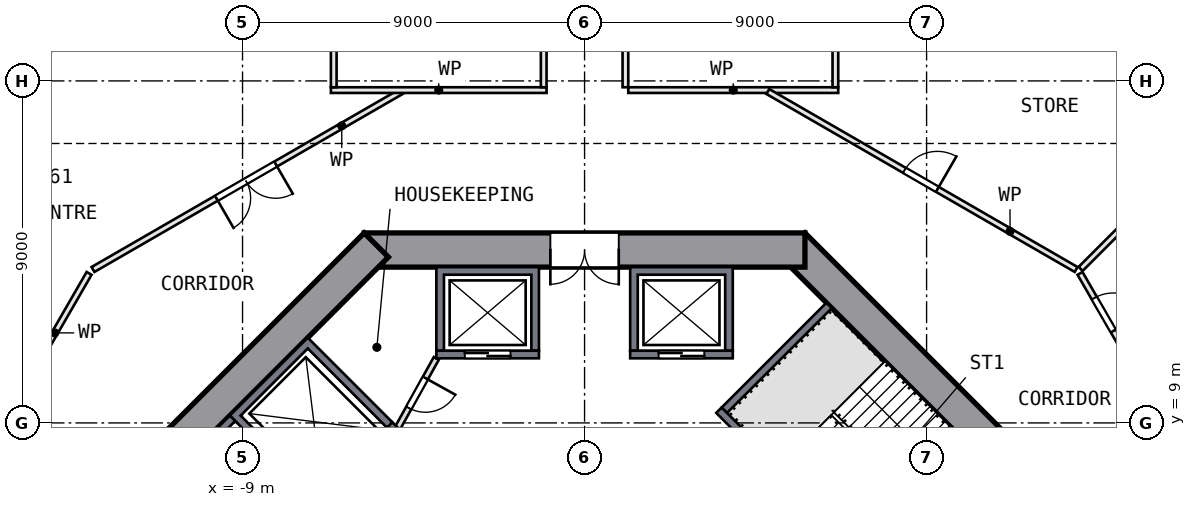
"""IFC4 building model, lengths in metres.
Left out: names, types, materials, properties, quantities, classifications, styles, units other than length and angle.
Written with IfcOpenShell. Run it as: python <this file> out.ifc"""

import sys

from ifc_helpers import new_model, si_unit, direction, frame, frame_2d, origin, place, context, subcontext, project, spatial, polyline, rectangle, outline, extrude, element, fill, save


model = new_model("IFC4")
c1 = context("Model", 3, precision=1e-05, world=origin(), true_north=direction((0.0, 1.0)))
c2 = subcontext(c1, "Body", "Model", "MODEL_VIEW")
j1 = project(units=[si_unit("LENGTHUNIT", "METRE"), si_unit("PLANEANGLEUNIT", "RADIAN")], contexts=[c1])
p1 = place(None, origin())
s1 = spatial("IfcSite", under=j1, at=p1, CompositionType="ELEMENT")
p2 = place(p1, origin())
s2 = spatial("IfcBuilding", under=s1, at=p2, CompositionType="ELEMENT")
p3 = place(p2, frame((0.0, 0.0, 14.0)))
s3 = spatial("IfcBuildingStorey", under=s2, at=p3, CompositionType="ELEMENT", Elevation=14.0)
p4 = place(p3, frame((13.682, 5.481, 0.0), z_axis=(0.0, 0.0, 1.0), x_axis=(-0.707106781, 0.707106781, 0.0)))
e1 = element("IfcWall", 1, at=p4, inside=s3, PredefinedType="SHEAR", context=c2, shape_type="SweptSolid", body=[
    extrude(rectangle(XDim=11.598, YDim=0.9, at=frame_2d((5.799, 0.0))), origin(), (0.0, 0.0, 1.0), 5.0),
])
p5 = place(p4, frame((2.099, 0.0, 0.0)))
e2 = element("IfcOpeningElement", 2, at=p5, cuts=e1, PredefinedType="OPENING", context=c2, shape_type="SweptSolid", body=[
    extrude(rectangle(XDim=1.2, YDim=2.1, at=frame_2d((0.6, 1.05))), frame((0.0, 0.46, 0.0), z_axis=(0.0, -1.0, 0.0), x_axis=(1.0, 0.0, 0.0)), (0.0, 0.0, 1.0), 0.92),
])
p6 = place(p3, frame((5.799, 13.55, 0.0), z_axis=(0.0, 0.0, 1.0), x_axis=(-1.0, 0.0, 0.0)))
e3 = element("IfcWall", 3, at=p6, inside=s3, PredefinedType="SHEAR", context=c2, shape_type="SweptSolid", body=[
    extrude(rectangle(XDim=11.598, YDim=0.9, at=frame_2d((5.799, 0.0))), origin(), (0.0, 0.0, 1.0), 5.0),
])
p7 = place(p6, frame((4.899, 0.0, 0.0)))
e4 = element("IfcOpeningElement", 4, at=p7, cuts=e3, PredefinedType="OPENING", context=c2, shape_type="SweptSolid", body=[
    extrude(rectangle(XDim=1.8, YDim=2.1, at=frame_2d((0.9, 1.05))), frame((0.0, 0.46, 0.0), z_axis=(0.0, -1.0, 0.0), x_axis=(1.0, 0.0, 0.0)), (0.0, 0.0, 1.0), 0.92),
])
p8 = place(p3, frame((-5.481, 13.682, 0.0), z_axis=(0.0, 0.0, 1.0), x_axis=(-0.707106781, -0.707106781, 0.0)))
e5 = element("IfcWall", 5, at=p8, inside=s3, PredefinedType="SHEAR", context=c2, shape_type="SweptSolid", body=[
    extrude(rectangle(XDim=11.598, YDim=0.9, at=frame_2d((5.799, 0.0))), origin(), (0.0, 0.0, 1.0), 5.0),
])
p9 = place(p3, frame((17.586, 17.777, 0.0), z_axis=(0.0, 0.0, 1.0), x_axis=(-0.866023287, 0.500003667, 0.0)))
e6 = element("IfcWall", 6, at=p9, inside=s3, PredefinedType="SOLIDWALL", context=c2, shape_type="SweptSolid", body=[
    extrude(rectangle(XDim=12.801, YDim=0.14, at=frame_2d((6.4, 0.0))), origin(), (0.0, 0.0, 1.0), 4.55),
])
p10 = place(p3, frame((-6.36, 24.258, 0.0), z_axis=(0.0, 0.0, 1.0), x_axis=(-0.866029009, -0.499993756, 0.0)))
e7 = element("IfcWall", 7, at=p10, inside=s3, PredefinedType="SOLIDWALL", context=c2, shape_type="SweptSolid", body=[
    extrude(rectangle(XDim=13.242, YDim=0.14, at=frame_2d((6.621, 0.0))), origin(), (0.0, 0.0, 1.0), 4.55),
])
p11 = place(p10, frame((1.46, 0.0, 0.9)))
e8 = element("IfcOpeningElement", 8, at=p11, cuts=e7, PredefinedType="OPENING", context=c2, shape_type="SweptSolid", body=[
    extrude(rectangle(XDim=3.6, YDim=2.7, at=frame_2d((1.8, 1.35))), frame((0.0, 0.08, 0.0), z_axis=(0.0, -1.0, 0.0), x_axis=(1.0, 0.0, 0.0)), (0.0, 0.0, 1.0), 0.16),
])
p12 = place(p10, frame((8.215, 0.0, 0.9)))
e9 = element("IfcOpeningElement", 9, at=p12, cuts=e7, PredefinedType="OPENING", context=c2, shape_type="SweptSolid", body=[
    extrude(rectangle(XDim=3.0, YDim=2.7, at=frame_2d((1.5, 1.35))), frame((0.0, 0.08, 0.0), z_axis=(0.0, -1.0, 0.0), x_axis=(1.0, 0.0, 0.0)), (0.0, 0.0, 1.0), 0.16),
])
p13 = place(p3, origin())
e10 = element("IfcWall", 10, at=p13, inside=s3, PredefinedType="SOLIDWALL", context=c2, shape_type="SweptSolid", body=[
    extrude(outline(polyline([(3.9, 13.1), (3.9, 10.9), (3.7, 10.9), (3.7, 12.9), (1.4, 12.9), (1.4, 10.9), (1.2, 10.9), (1.2, 13.1), (3.9, 13.1)])), origin(), (0.0, 0.0, 1.0), 4.55),
])
p14 = place(p3, frame((1.2, 10.8, 0.0), z_axis=(0.0, 0.0, 1.0), x_axis=(1.0, 0.0, 0.0)))
e11 = element("IfcWall", 11, at=p14, inside=s3, PredefinedType="SOLIDWALL", context=c2, shape_type="SweptSolid", body=[
    extrude(rectangle(XDim=2.7, YDim=0.2, at=frame_2d((1.35, 0.0))), origin(), (0.0, 0.0, 1.0), 4.55),
])
p15 = place(p14, frame((0.75, 0.0, 0.0)))
e12 = element("IfcOpeningElement", 12, at=p15, cuts=e11, PredefinedType="OPENING", context=c2, shape_type="SweptSolid", body=[
    extrude(rectangle(XDim=1.2, YDim=2.1, at=frame_2d((0.6, 1.05))), frame((0.0, 0.11, 0.0), z_axis=(0.0, -1.0, 0.0), x_axis=(1.0, 0.0, 0.0)), (0.0, 0.0, 1.0), 0.22),
])
p16 = place(p3, origin())
e13 = element("IfcWall", 13, at=p16, inside=s3, PredefinedType="SOLIDWALL", context=c2, shape_type="SweptSolid", body=[
    extrude(outline(polyline([(-3.9, 10.9), (-3.9, 13.1), (-1.2, 13.1), (-1.2, 10.9), (-1.4, 10.9), (-1.4, 12.9), (-3.7, 12.9), (-3.7, 10.9), (-3.9, 10.9)])), origin(), (0.0, 0.0, 1.0), 4.55),
])
p17 = place(p3, frame((-1.2, 10.8, 0.0), z_axis=(0.0, 0.0, 1.0), x_axis=(-1.0, 0.0, 0.0)))
e14 = element("IfcWall", 14, at=p17, inside=s3, PredefinedType="SOLIDWALL", context=c2, shape_type="SweptSolid", body=[
    extrude(rectangle(XDim=2.7, YDim=0.2, at=frame_2d((1.35, 0.0))), origin(), (0.0, 0.0, 1.0), 4.55),
])
p18 = place(p17, frame((0.75, 0.0, 0.0)))
e15 = element("IfcOpeningElement", 15, at=p18, cuts=e14, PredefinedType="OPENING", context=c2, shape_type="SweptSolid", body=[
    extrude(rectangle(XDim=1.2, YDim=2.1, at=frame_2d((0.6, 1.05))), frame((0.0, 0.11, 0.0), z_axis=(0.0, -1.0, 0.0), x_axis=(1.0, 0.0, 0.0)), (0.0, 0.0, 1.0), 0.22),
])
p19 = place(p3, origin())
e16 = element("IfcWall", 16, at=p19, inside=s3, PredefinedType="SOLIDWALL", context=c2, shape_type="SweptSolid", body=[
    extrude(outline(polyline([(-9.334, 9.192), (-7.283, 11.243), (-5.056, 9.016), (-5.197, 8.874), (-7.283, 10.96), (-9.051, 9.192), (-6.965, 7.106), (-7.106, 6.965), (-9.334, 9.192)])), origin(), (0.0, 0.0, 1.0), 4.55),
])
p20 = place(p3, frame((-4.985, 8.945, 0.0), z_axis=(0.0, 0.0, 1.0), x_axis=(-0.707106781, -0.707106781, 0.0)))
e17 = element("IfcWall", 17, at=p20, inside=s3, PredefinedType="SOLIDWALL", context=c2, shape_type="SweptSolid", body=[
    extrude(rectangle(XDim=2.9, YDim=0.2, at=frame_2d((1.45, 0.0))), origin(), (0.0, 0.0, 1.0), 4.55),
])
p21 = place(p20, frame((0.85, 0.0, 0.0)))
e18 = element("IfcOpeningElement", 18, at=p21, cuts=e17, PredefinedType="OPENING", context=c2, shape_type="SweptSolid", body=[
    extrude(rectangle(XDim=1.2, YDim=2.1, at=frame_2d((0.6, 1.05))), frame((0.0, 0.11, 0.0), z_axis=(0.0, -1.0, 0.0), x_axis=(1.0, 0.0, 0.0)), (0.0, 0.0, 1.0), 0.22),
])
p22 = place(p3, origin())
e19 = element("IfcWall", 19, at=p22, inside=s3, PredefinedType="SOLIDWALL", context=c2, shape_type="SweptSolid", body=[
    extrude(outline(polyline([(-11.243, 7.283), (-9.334, 9.192), (-9.192, 9.051), (-10.96, 7.283), (-8.874, 5.197), (-9.016, 5.056), (-11.243, 7.283)])), origin(), (0.0, 0.0, 1.0), 4.55),
])
p23 = place(p3, frame((3.535, 9.334, 0.0), z_axis=(0.0, 0.0, 1.0), x_axis=(0.707106781, -0.707106781, 0.0)))
e20 = element("IfcWall", 20, at=p23, inside=s3, PredefinedType="SOLIDWALL", context=c2, shape_type="SweptSolid", body=[
    extrude(rectangle(XDim=8.2, YDim=0.2, at=frame_2d((4.1, 0.0))), origin(), (0.0, 0.0, 1.0), 4.55),
])
p24 = place(p23, frame((6.6, 0.0, 0.0)))
e21 = element("IfcOpeningElement", 21, at=p24, cuts=e20, PredefinedType="OPENING", context=c2, shape_type="SweptSolid", body=[
    extrude(rectangle(XDim=1.2, YDim=2.1, at=frame_2d((0.6, 1.05))), frame((0.0, 0.11, 0.0), z_axis=(0.0, -1.0, 0.0), x_axis=(1.0, 0.0, 0.0)), (0.0, 0.0, 1.0), 0.22),
])
p25 = place(p3, frame((3.677, 9.334, 0.0), z_axis=(0.0, 0.0, 1.0), x_axis=(0.707106781, 0.707106781, 0.0)))
e22 = element("IfcWall", 22, at=p25, inside=s3, PredefinedType="SOLIDWALL", context=c2, shape_type="SweptSolid", body=[
    extrude(rectangle(XDim=3.9, YDim=0.2, at=frame_2d((1.95, 0.0))), origin(), (0.0, 0.0, 1.0), 4.55),
])
p26 = place(p3, frame((-3.9, 10.7, 0.0), z_axis=(0.0, 0.0, 1.0), x_axis=(-0.485692555, -0.874129705, 0.0)))
e23 = element("IfcWall", 23, at=p26, inside=s3, PredefinedType="PARTITIONING", context=c2, shape_type="SweptSolid", body=[
    extrude(rectangle(XDim=2.089, YDim=0.15, at=frame_2d((1.044, 0.0))), origin(), (0.0, 0.0, 1.0), 4.55),
])
p27 = place(p26, frame((0.594, 0.0, 0.0)))
e24 = element("IfcOpeningElement", 24, at=p27, cuts=e23, PredefinedType="OPENING", context=c2, shape_type="SweptSolid", body=[
    extrude(rectangle(XDim=0.9, YDim=2.1, at=frame_2d((0.45, 1.05))), frame((0.0, 0.085, 0.0), z_axis=(0.0, -1.0, 0.0), x_axis=(1.0, 0.0, 0.0)), (0.0, 0.0, 1.0), 0.17),
])
p28 = place(p3, frame((-13.038, 12.935, 0.0), z_axis=(0.0, 0.0, 1.0), x_axis=(-0.499979668, -0.866037142, 0.0)))
e25 = element("IfcWall", 25, at=p28, inside=s3, PredefinedType="PARTITIONING", context=c2, shape_type="SweptSolid", body=[
    extrude(rectangle(XDim=9.367, YDim=0.15, at=frame_2d((4.683, 0.0))), origin(), (0.0, 0.0, 1.0), 4.55),
])
p29 = place(p28, frame((3.817, 0.0, 0.0)))
e26 = element("IfcOpeningElement", 26, at=p29, cuts=e25, PredefinedType="OPENING", context=c2, shape_type="SweptSolid", body=[
    extrude(rectangle(XDim=1.8, YDim=2.1, at=frame_2d((0.9, 1.05))), frame((0.0, 0.085, 0.0), z_axis=(0.0, -1.0, 0.0), x_axis=(1.0, 0.0, 0.0)), (0.0, 0.0, 1.0), 0.17),
])
p30 = place(p3, frame((-4.823, 17.721, 0.0), z_axis=(0.0, 0.0, 1.0), x_axis=(-0.866037142, -0.499979668, 0.0)))
e27 = element("IfcWall", 27, at=p30, inside=s3, PredefinedType="PARTITIONING", context=c2, shape_type="SweptSolid", body=[
    extrude(rectangle(XDim=9.367, YDim=0.15, at=frame_2d((4.683, 0.0))), origin(), (0.0, 0.0, 1.0), 4.55),
])
p31 = place(p30, frame((3.817, 0.0, 0.0)))
e28 = element("IfcOpeningElement", 28, at=p31, cuts=e27, PredefinedType="OPENING", context=c2, shape_type="SweptSolid", body=[
    extrude(rectangle(XDim=1.8, YDim=2.1, at=frame_2d((0.9, 1.05))), frame((0.0, 0.085, 0.0), z_axis=(0.0, -1.0, 0.0), x_axis=(1.0, 0.0, 0.0)), (0.0, 0.0, 1.0), 0.17),
])
p32 = place(p3, frame((-6.675, 17.758, 0.0), z_axis=(0.0, 0.0, 1.0), x_axis=(1.0, 0.0, 0.0)))
e29 = element("IfcWall", 29, at=p32, inside=s3, PredefinedType="PARTITIONING", context=c2, shape_type="SweptSolid", body=[
    extrude(rectangle(XDim=5.675, YDim=0.15, at=frame_2d((2.838, 0.0))), origin(), (0.0, 0.0, 1.0), 4.55),
])
p33 = place(p3, frame((-6.6, 23.415, 0.0), z_axis=(0.0, 0.0, 1.0), x_axis=(0.0, -1.0, 0.0)))
e30 = element("IfcWall", 30, at=p33, inside=s3, PredefinedType="PARTITIONING", context=c2, shape_type="SweptSolid", body=[
    extrude(rectangle(XDim=5.582, YDim=0.15, at=frame_2d((2.791, 0.0))), origin(), (0.0, 0.0, 1.0), 4.55),
])
p34 = place(p3, frame((-1.075, 17.833, 0.0), z_axis=(0.0, 0.0, 1.0), x_axis=(0.0, 1.0, 0.0)))
e31 = element("IfcWall", 31, at=p34, inside=s3, PredefinedType="PARTITIONING", context=c2, shape_type="SweptSolid", body=[
    extrude(rectangle(XDim=5.945, YDim=0.15, at=frame_2d((2.973, 0.0))), origin(), (0.0, 0.0, 1.0), 4.55),
])
p35 = place(p34, frame((2.395, 0.0, 0.0)))
e32 = element("IfcOpeningElement", 32, at=p35, cuts=e31, PredefinedType="OPENING", context=c2, shape_type="SweptSolid", body=[
    extrude(rectangle(XDim=1.0, YDim=2.1, at=frame_2d((0.5, 1.05))), frame((0.0, 0.085, 0.0), z_axis=(0.0, -1.0, 0.0), x_axis=(1.0, 0.0, 0.0)), (0.0, 0.0, 1.0), 0.17),
])
p36 = place(p3, frame((1.075, 23.778, 0.0), z_axis=(0.0, 0.0, 1.0), x_axis=(0.0, -1.0, 0.0)))
e33 = element("IfcWall", 33, at=p36, inside=s3, PredefinedType="PARTITIONING", context=c2, shape_type="SweptSolid", body=[
    extrude(rectangle(XDim=5.945, YDim=0.15, at=frame_2d((2.973, 0.0))), origin(), (0.0, 0.0, 1.0), 4.55),
])
p37 = place(p36, frame((2.395, 0.0, 0.0)))
e34 = element("IfcOpeningElement", 34, at=p37, cuts=e33, PredefinedType="OPENING", context=c2, shape_type="SweptSolid", body=[
    extrude(rectangle(XDim=1.0, YDim=2.1, at=frame_2d((0.5, 1.05))), frame((0.0, 0.085, 0.0), z_axis=(0.0, -1.0, 0.0), x_axis=(1.0, 0.0, 0.0)), (0.0, 0.0, 1.0), 0.17),
])
p38 = place(p3, frame((1.15, 17.758, 0.0), z_axis=(0.0, 0.0, 1.0), x_axis=(1.0, 0.0, 0.0)))
e35 = element("IfcWall", 35, at=p38, inside=s3, PredefinedType="PARTITIONING", context=c2, shape_type="SweptSolid", body=[
    extrude(rectangle(XDim=5.525, YDim=0.15, at=frame_2d((2.763, 0.0))), origin(), (0.0, 0.0, 1.0), 4.55),
])
p39 = place(p3, frame((4.823, 17.721, 0.0), z_axis=(0.0, 0.0, 1.0), x_axis=(0.866037142, -0.499979668, 0.0)))
e36 = element("IfcWall", 36, at=p39, inside=s3, PredefinedType="PARTITIONING", context=c2, shape_type="SweptSolid", body=[
    extrude(rectangle(XDim=9.367, YDim=0.15, at=frame_2d((4.683, 0.0))), origin(), (0.0, 0.0, 1.0), 4.55),
])
p40 = place(p39, frame((4.15, 0.0, 0.0)))
e37 = element("IfcOpeningElement", 37, at=p40, cuts=e36, PredefinedType="OPENING", context=c2, shape_type="SweptSolid", body=[
    extrude(rectangle(XDim=1.0, YDim=2.1, at=frame_2d((0.5, 1.05))), frame((0.0, 0.085, 0.0), z_axis=(0.0, -1.0, 0.0), x_axis=(1.0, 0.0, 0.0)), (0.0, 0.0, 1.0), 0.17),
])
p41 = place(p3, frame((6.6, 17.833, 0.0), z_axis=(0.0, 0.0, 1.0), x_axis=(0.0, 1.0, 0.0)))
e38 = element("IfcWall", 38, at=p41, inside=s3, PredefinedType="PARTITIONING", context=c2, shape_type="SweptSolid", body=[
    extrude(rectangle(XDim=5.582, YDim=0.15, at=frame_2d((2.791, 0.0))), origin(), (0.0, 0.0, 1.0), 4.55),
])
p42 = place(p3, frame((13.038, 12.935, 0.0), z_axis=(0.0, 0.0, 1.0), x_axis=(0.499933044, -0.866064057, 0.0)))
e39 = element("IfcWall", 39, at=p42, inside=s3, PredefinedType="PARTITIONING", context=c2, shape_type="SweptSolid", body=[
    extrude(rectangle(XDim=2.408, YDim=0.15, at=frame_2d((1.204, 0.0))), origin(), (0.0, 0.0, 1.0), 4.55),
])
p43 = place(p42, frame((0.75, 0.0, 0.0)))
e40 = element("IfcOpeningElement", 40, at=p43, cuts=e39, PredefinedType="OPENING", context=c2, shape_type="SweptSolid", body=[
    extrude(rectangle(XDim=1.0, YDim=2.1, at=frame_2d((0.5, 1.05))), frame((0.0, 0.085, 0.0), z_axis=(0.0, -1.0, 0.0), x_axis=(1.0, 0.0, 0.0)), (0.0, 0.0, 1.0), 0.17),
])
p44 = place(p3, frame((17.7, 17.7, 0.0), z_axis=(0.0, 0.0, 1.0), x_axis=(-0.707106781, -0.707106781, 0.0)))
e41 = element("IfcWall", 41, at=p44, inside=s3, PredefinedType="PARTITIONING", context=c2, shape_type="SweptSolid", body=[
    extrude(rectangle(XDim=6.572, YDim=0.15, at=frame_2d((3.286, 0.0))), origin(), (0.0, 0.0, 1.0), 4.55),
])
p45 = place(p12, origin())
e42 = element("IfcWindow", 42, at=p45, inside=s3, PartitioningType="SINGLE_PANEL", PredefinedType="WINDOW", context=c2, shape_type="SweptSolid", body=[
    extrude(rectangle(XDim=3.0, YDim=2.7, at=frame_2d((1.5, 1.35))), frame((0.0, 0.03, 0.0), z_axis=(0.0, -1.0, 0.0), x_axis=(1.0, 0.0, 0.0)), (0.0, 0.0, 1.0), 0.06),
])
fill(e9, e42)
p46 = place(p15, origin())
e43 = element("IfcDoor", 43, at=p46, inside=s3, OperationType="DOUBLE_DOOR_SLIDING", PredefinedType="DOOR", context=c2, shape_type="SweptSolid", body=[
    extrude(rectangle(XDim=1.2, YDim=2.1, at=frame_2d((0.6, 1.05))), frame((0.0, 0.025, 0.0), z_axis=(0.0, -1.0, 0.0), x_axis=(1.0, 0.0, 0.0)), (0.0, 0.0, 1.0), 0.05),
])
fill(e12, e43)
p47 = place(p18, origin())
e44 = element("IfcDoor", 44, at=p47, inside=s3, OperationType="DOUBLE_DOOR_SLIDING", PredefinedType="DOOR", context=c2, shape_type="SweptSolid", body=[
    extrude(rectangle(XDim=1.2, YDim=2.1, at=frame_2d((0.6, 1.05))), frame((0.0, 0.025, 0.0), z_axis=(0.0, -1.0, 0.0), x_axis=(1.0, 0.0, 0.0)), (0.0, 0.0, 1.0), 0.05),
])
fill(e15, e44)
p48 = place(p7, origin())
e45 = element("IfcDoor", 45, at=p48, inside=s3, OperationType="DOUBLE_DOOR_SINGLE_SWING", PredefinedType="DOOR", context=c2, shape_type="SweptSolid", body=[
    extrude(rectangle(XDim=1.8, YDim=2.1, at=frame_2d((0.9, 1.05))), frame((0.0, 0.025, 0.0), z_axis=(0.0, -1.0, 0.0), x_axis=(1.0, 0.0, 0.0)), (0.0, 0.0, 1.0), 0.05),
])
fill(e4, e45)
p49 = place(p27, origin())
e46 = element("IfcDoor", 46, at=p49, inside=s3, OperationType="SINGLE_SWING_LEFT", PredefinedType="DOOR", context=c2, shape_type="SweptSolid", body=[
    extrude(rectangle(XDim=0.9, YDim=2.1, at=frame_2d((0.45, 1.05))), frame((0.0, 0.025, 0.0), z_axis=(0.0, -1.0, 0.0), x_axis=(1.0, 0.0, 0.0)), (0.0, 0.0, 1.0), 0.05),
])
fill(e24, e46)
p50 = place(p31, origin())
e47 = element("IfcDoor", 47, at=p50, inside=s3, OperationType="DOUBLE_DOOR_SINGLE_SWING", PredefinedType="DOOR", context=c2, shape_type="SweptSolid", body=[
    extrude(rectangle(XDim=1.8, YDim=2.1, at=frame_2d((0.9, 1.05))), frame((0.0, 0.025, 0.0), z_axis=(0.0, -1.0, 0.0), x_axis=(1.0, 0.0, 0.0)), (0.0, 0.0, 1.0), 0.05),
])
fill(e28, e47)
p51 = place(p40, origin())
e48 = element("IfcDoor", 48, at=p51, inside=s3, OperationType="SINGLE_SWING_RIGHT", PredefinedType="DOOR", context=c2, shape_type="SweptSolid", body=[
    extrude(rectangle(XDim=1.0, YDim=2.1, at=frame_2d((0.5, 1.05))), frame((0.0, 0.025, 0.0), z_axis=(0.0, -1.0, 0.0), x_axis=(1.0, 0.0, 0.0)), (0.0, 0.0, 1.0), 0.05),
])
fill(e37, e48)
p52 = place(p43, origin())
e49 = element("IfcDoor", 49, at=p52, inside=s3, OperationType="SINGLE_SWING_RIGHT", PredefinedType="DOOR", context=c2, shape_type="SweptSolid", body=[
    extrude(rectangle(XDim=1.0, YDim=2.1, at=frame_2d((0.5, 1.05))), frame((0.0, 0.025, 0.0), z_axis=(0.0, -1.0, 0.0), x_axis=(1.0, 0.0, 0.0)), (0.0, 0.0, 1.0), 0.05),
])
fill(e40, e49)
save(model, sys.argv[1])
